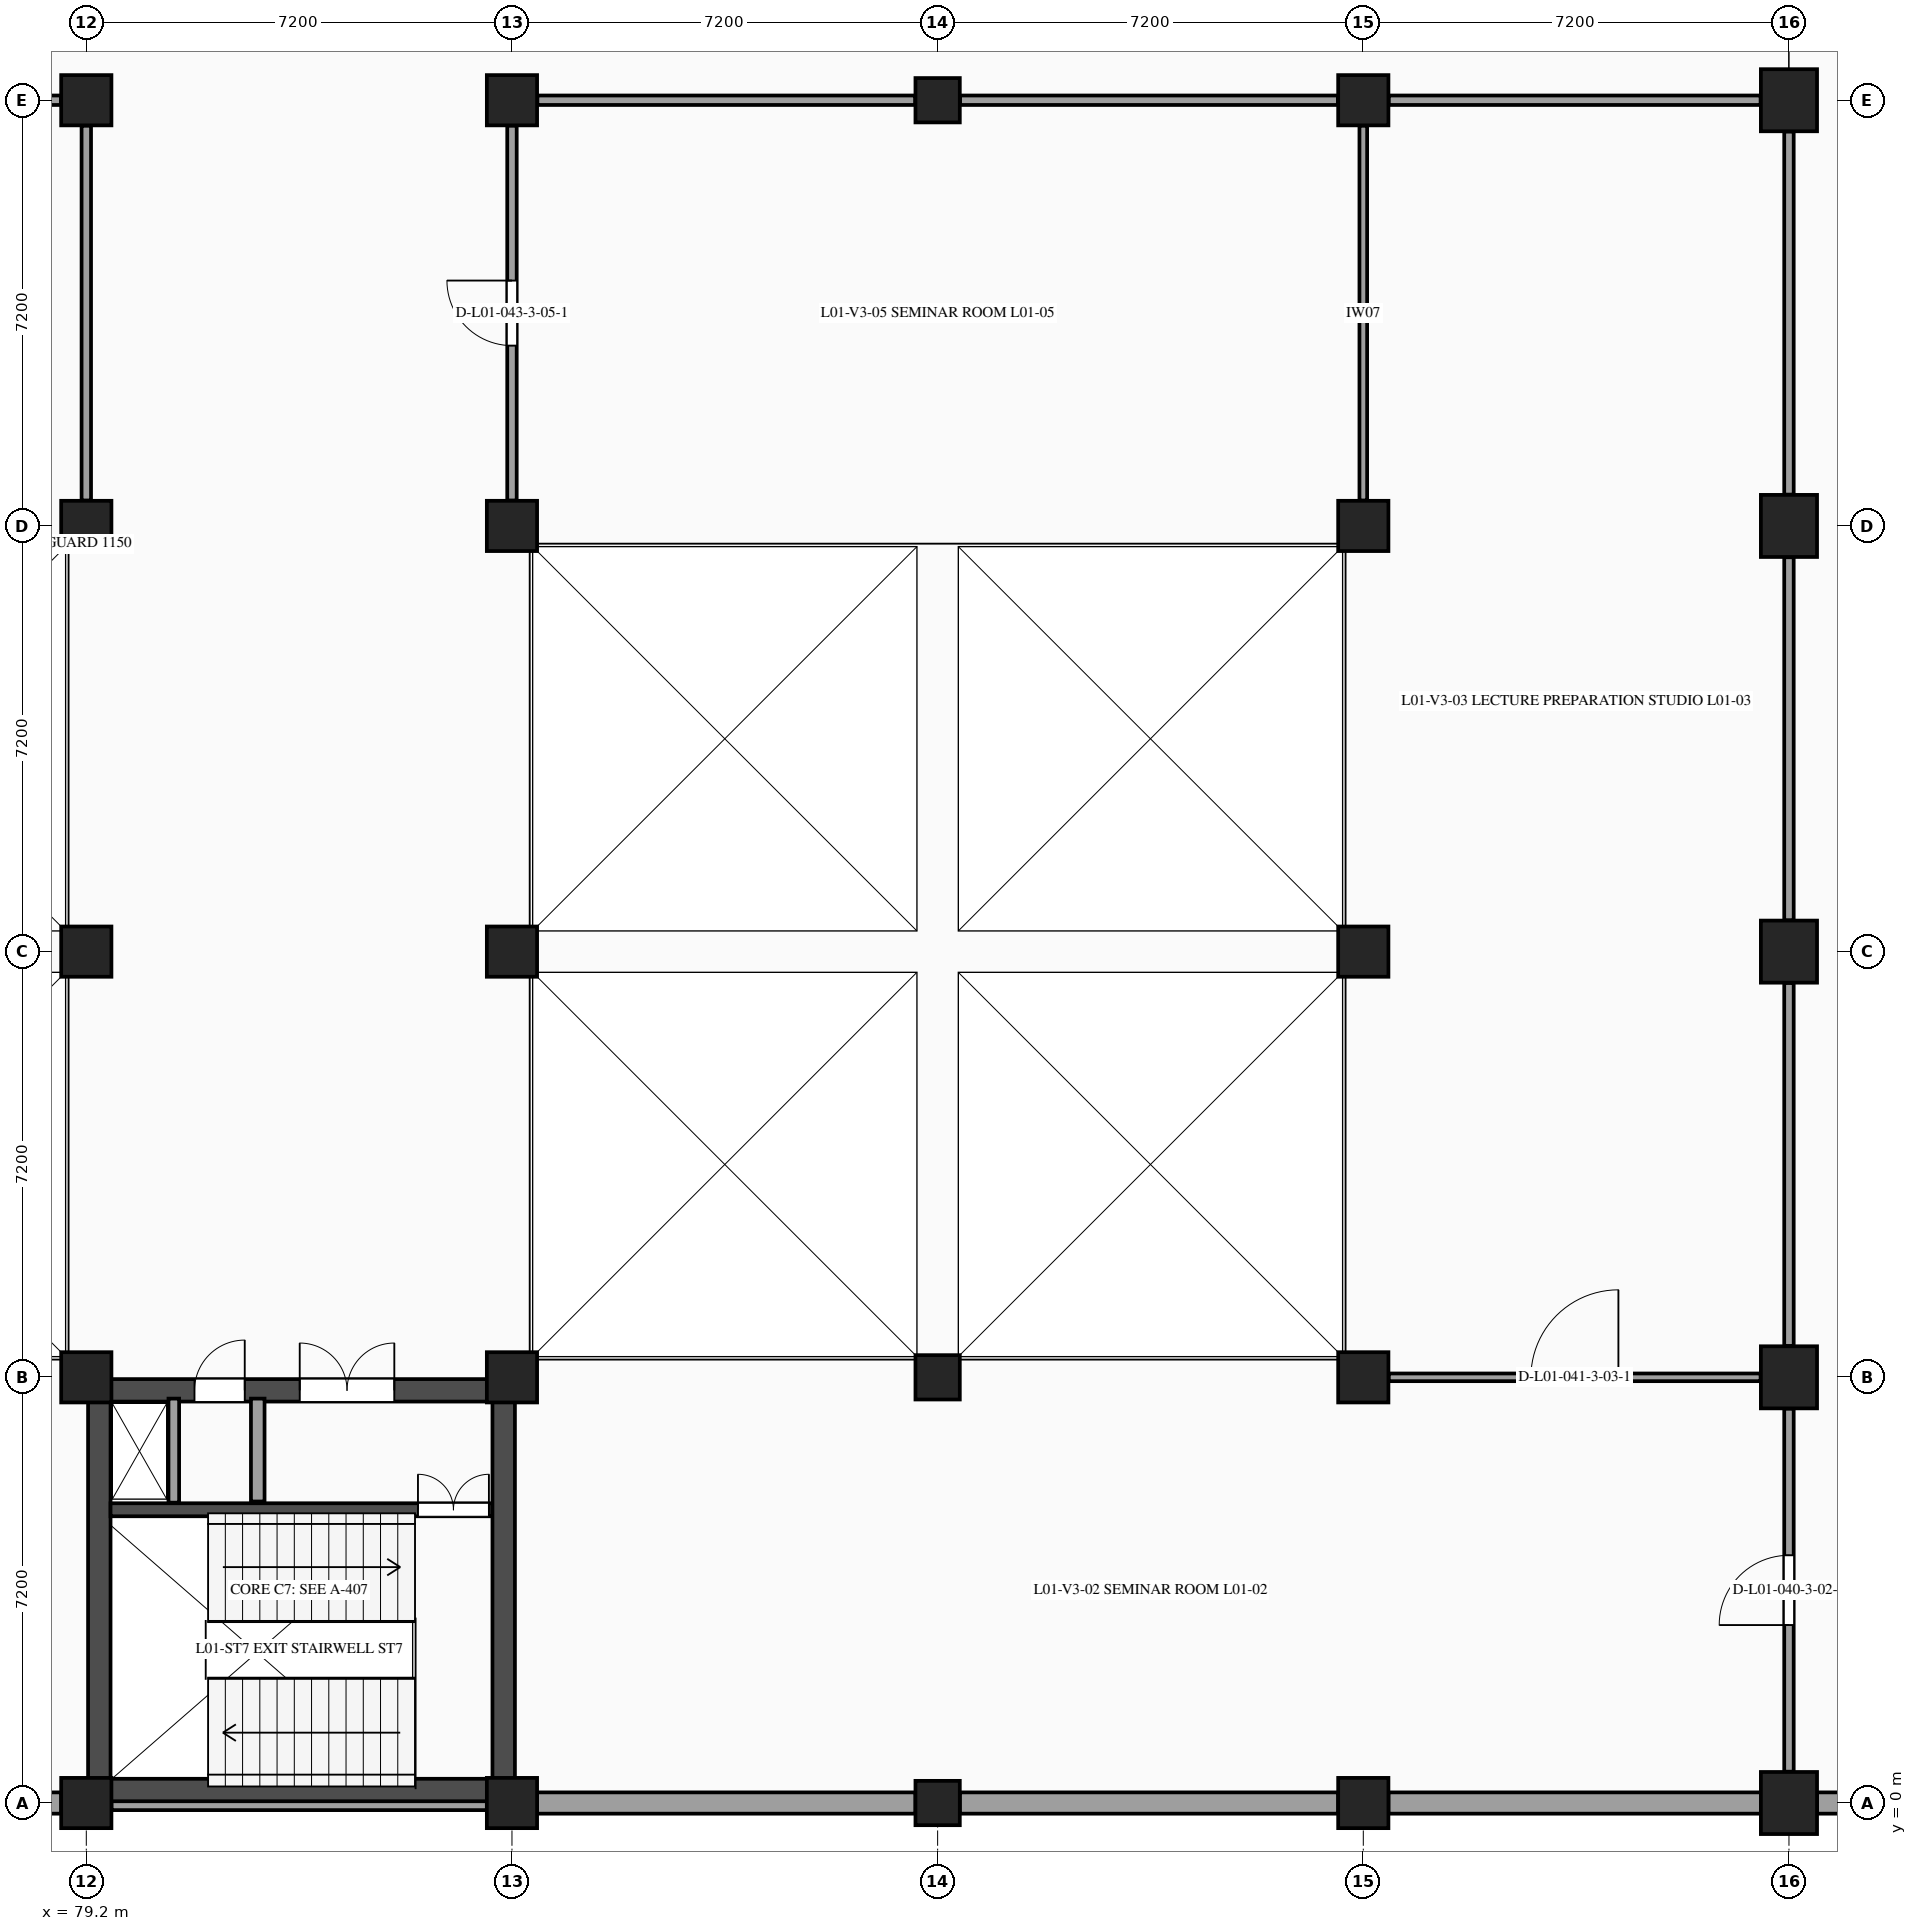
"""IFC4 building model, lengths in metres.
Left out: names, types, materials, properties, quantities, classifications, styles, units other than length and angle.
Written with IfcOpenShell. Run it as: python <this file> out.ifc"""

import sys

from ifc_helpers import new_model, si_unit, direction, frame, frame_2d, origin, origin_2d, place, context, subcontext, project, spatial, rectangle, extrude, element, fill, save


model = new_model("IFC4")
c1 = context("Model", 3, precision=1e-05, world=origin(), true_north=direction((0.0, 1.0)))
c2 = subcontext(c1, "Body", "Model", "MODEL_VIEW")
j1 = project(units=[si_unit("LENGTHUNIT", "METRE"), si_unit("PLANEANGLEUNIT", "RADIAN")], contexts=[c1])
p1 = place(None, origin())
s1 = spatial("IfcSite", under=j1, at=p1, CompositionType="ELEMENT")
p2 = place(p1, origin())
s2 = spatial("IfcBuilding", under=s1, at=p2, CompositionType="ELEMENT")
p3 = place(p2, frame((0.0, 0.0, 5.4)))
s3 = spatial("IfcBuildingStorey", under=s2, at=p3, CompositionType="ELEMENT", Elevation=5.4)
for number, where, z_axis, x_axis in (
    (1, (79.2, 0.0, 0.0), (0.0, 0.0, 1.0), (1.0, 0.0, 0.0)),
    (2, (79.2, 7.2, 0.0), (0.0, 0.0, 1.0), (1.0, 0.0, 0.0)),
    (3, (79.2, 14.4, 0.0), (0.0, 0.0, 1.0), (1.0, 0.0, 0.0)),
    (4, (79.2, 21.6, 0.0), (0.0, 0.0, 1.0), (1.0, 0.0, 0.0)),
    (5, (79.2, 28.8, 0.0), (0.0, 0.0, 1.0), (1.0, 0.0, 0.0)),
    (6, (86.4, 0.0, 0.0), (0.0, 0.0, 1.0), (1.0, 0.0, 0.0)),
    (7, (86.4, 7.2, 0.0), (0.0, 0.0, 1.0), (1.0, 0.0, 0.0)),
    (8, (86.4, 14.4, 0.0), (0.0, 0.0, 1.0), (1.0, 0.0, 0.0)),
    (9, (86.4, 21.6, 0.0), (0.0, 0.0, 1.0), (1.0, 0.0, 0.0)),
    (10, (86.4, 28.8, 0.0), (0.0, 0.0, 1.0), (1.0, 0.0, 0.0)),
):
    element("IfcColumn", number, at=place(p3, frame(where, z_axis=z_axis, x_axis=x_axis)), inside=s3, PredefinedType="COLUMN", context=c2, shape_type="SweptSolid", body=[
        extrude(rectangle(XDim=0.85, YDim=0.85, at=origin_2d()), origin(), (0.0, 0.0, 1.0), 4.5),
    ])
for number, where, z_axis, x_axis in (
    (11, (93.6, 0.0, 0.0), (0.0, 0.0, 1.0), (1.0, 0.0, 0.0)),
    (12, (93.6, 7.2, 0.0), (0.0, 0.0, 1.0), (1.0, 0.0, 0.0)),
    (13, (93.6, 28.8, 0.0), (0.0, 0.0, 1.0), (1.0, 0.0, 0.0)),
):
    element("IfcColumn", number, at=place(p3, frame(where, z_axis=z_axis, x_axis=x_axis)), inside=s3, PredefinedType="COLUMN", context=c2, shape_type="SweptSolid", body=[
        extrude(rectangle(XDim=0.75, YDim=0.75, at=origin_2d()), origin(), (0.0, 0.0, 1.0), 4.5),
    ])
for number, where, z_axis, x_axis in (
    (14, (100.8, 0.0, 0.0), (0.0, 0.0, 1.0), (1.0, 0.0, 0.0)),
    (15, (100.8, 7.2, 0.0), (0.0, 0.0, 1.0), (1.0, 0.0, 0.0)),
    (16, (100.8, 14.4, 0.0), (0.0, 0.0, 1.0), (1.0, 0.0, 0.0)),
    (17, (100.8, 21.6, 0.0), (0.0, 0.0, 1.0), (1.0, 0.0, 0.0)),
    (18, (100.8, 28.8, 0.0), (0.0, 0.0, 1.0), (1.0, 0.0, 0.0)),
):
    element("IfcColumn", number, at=place(p3, frame(where, z_axis=z_axis, x_axis=x_axis)), inside=s3, PredefinedType="COLUMN", context=c2, shape_type="SweptSolid", body=[
        extrude(rectangle(XDim=0.85, YDim=0.85, at=origin_2d()), origin(), (0.0, 0.0, 1.0), 4.5),
    ])
for number, where, z_axis, x_axis in (
    (19, (108.0, 0.0, 0.0), (0.0, 0.0, 1.0), (1.0, 0.0, 0.0)),
    (20, (108.0, 7.2, 0.0), (0.0, 0.0, 1.0), (1.0, 0.0, 0.0)),
    (21, (108.0, 14.4, 0.0), (0.0, 0.0, 1.0), (1.0, 0.0, 0.0)),
    (22, (108.0, 21.6, 0.0), (0.0, 0.0, 1.0), (1.0, 0.0, 0.0)),
    (23, (108.0, 28.8, 0.0), (0.0, 0.0, 1.0), (1.0, 0.0, 0.0)),
):
    element("IfcColumn", number, at=place(p3, frame(where, z_axis=z_axis, x_axis=x_axis)), inside=s3, PredefinedType="COLUMN", context=c2, shape_type="SweptSolid", body=[
        extrude(rectangle(XDim=0.95, YDim=1.05, at=origin_2d()), origin(), (0.0, 0.0, 1.0), 4.5),
    ])
p4 = place(p3, frame((114.7, 0.0, 0.0), z_axis=(0.0, 0.0, 1.0), x_axis=(-1.0, 0.0, 0.0)))
e24 = element("IfcWall", 24, at=p4, inside=s3, PredefinedType="STANDARD", context=c2, shape_type="SweptSolid", body=[
    extrude(rectangle(XDim=6.225, YDim=0.36, at=frame_2d((3.112, 0.0))), origin(), (0.0, 0.0, 1.0), 3.78),
])
p5 = place(p3, frame((107.525, 0.0, 0.0), z_axis=(0.0, 0.0, 1.0), x_axis=(-1.0, 0.0, 0.0)))
e25 = element("IfcWall", 25, at=p5, inside=s3, PredefinedType="STANDARD", context=c2, shape_type="SweptSolid", body=[
    extrude(rectangle(XDim=6.3, YDim=0.36, at=frame_2d((3.15, 0.0))), origin(), (0.0, 0.0, 1.0), 3.49),
])
p6 = place(p3, frame((100.375, 0.0, 0.0), z_axis=(0.0, 0.0, 1.0), x_axis=(-1.0, 0.0, 0.0)))
e26 = element("IfcWall", 26, at=p6, inside=s3, PredefinedType="STANDARD", context=c2, shape_type="SweptSolid", body=[
    extrude(rectangle(XDim=6.4, YDim=0.36, at=frame_2d((3.2, 0.0))), origin(), (0.0, 0.0, 1.0), 3.49),
])
p7 = place(p3, frame((93.225, 0.0, 0.0), z_axis=(0.0, 0.0, 1.0), x_axis=(-1.0, 0.0, 0.0)))
e27 = element("IfcWall", 27, at=p7, inside=s3, PredefinedType="STANDARD", context=c2, shape_type="SweptSolid", body=[
    extrude(rectangle(XDim=6.4, YDim=0.36, at=frame_2d((3.2, 0.0))), origin(), (0.0, 0.0, 1.0), 3.49),
])
p8 = place(p3, frame((85.975, 0.0, 0.0), z_axis=(0.0, 0.0, 1.0), x_axis=(-1.0, 0.0, 0.0)))
e28 = element("IfcWall", 28, at=p8, inside=s3, PredefinedType="STANDARD", context=c2, shape_type="SweptSolid", body=[
    extrude(rectangle(XDim=6.35, YDim=0.24, at=frame_2d((3.175, 0.0))), origin(), (0.0, 0.0, 1.0), 3.49),
])
p9 = place(p3, frame((78.775, 0.0, 0.0), z_axis=(0.0, 0.0, 1.0), x_axis=(-1.0, 0.0, 0.0)))
e29 = element("IfcWall", 29, at=p9, inside=s3, PredefinedType="STANDARD", context=c2, shape_type="SweptSolid", body=[
    extrude(rectangle(XDim=6.4, YDim=0.36, at=frame_2d((3.2, 0.0))), origin(), (0.0, 0.0, 1.0), 3.49),
])
p10 = place(p3, frame((79.61, 0.22, 0.0), z_axis=(0.0, 0.0, 1.0), x_axis=(1.0, 0.0, 0.0)))
e30 = element("IfcWall", 30, at=p10, inside=s3, PredefinedType="SHEAR", context=c2, shape_type="SweptSolid", body=[
    extrude(rectangle(XDim=6.46, YDim=0.38, at=frame_2d((3.23, 0.0))), origin(), (0.0, 0.0, 1.0), 4.21),
])
p11 = place(p3, frame((79.42, 7.17, 0.0), z_axis=(0.0, 0.0, 1.0), x_axis=(0.0, -1.0, 0.0)))
e31 = element("IfcWall", 31, at=p11, inside=s3, PredefinedType="SHEAR", context=c2, shape_type="SweptSolid", body=[
    extrude(rectangle(XDim=7.14, YDim=0.38, at=frame_2d((3.57, 0.0))), origin(), (0.0, 0.0, 1.0), 4.21),
])
p12 = place(p3, frame((79.61, 6.98, 0.0), z_axis=(0.0, 0.0, 1.0), x_axis=(1.0, 0.0, 0.0)))
e32 = element("IfcWall", 32, at=p12, inside=s3, PredefinedType="SHEAR", context=c2, shape_type="SweptSolid", body=[
    extrude(rectangle(XDim=6.46, YDim=0.38, at=frame_2d((3.23, 0.0))), origin(), (0.0, 0.0, 1.0), 4.21),
])
p13 = place(p12, frame((1.42, 0.0, 0.0)))
e33 = element("IfcOpeningElement", 33, at=p13, cuts=e32, PredefinedType="OPENING", context=c2, shape_type="SweptSolid", body=[
    extrude(rectangle(XDim=0.85, YDim=2.1, at=frame_2d((0.425, 1.05))), frame((0.0, 0.2, 0.0), z_axis=(0.0, -1.0, 0.0), x_axis=(1.0, 0.0, 0.0)), (0.0, 0.0, 1.0), 0.4),
])
p14 = place(p12, frame((3.2, 0.0, 0.0)))
e34 = element("IfcOpeningElement", 34, at=p14, cuts=e32, PredefinedType="OPENING", context=c2, shape_type="SweptSolid", body=[
    extrude(rectangle(XDim=1.6, YDim=2.2, at=frame_2d((0.8, 1.1))), frame((0.0, 0.2, 0.0), z_axis=(0.0, -1.0, 0.0), x_axis=(1.0, 0.0, 0.0)), (0.0, 0.0, 1.0), 0.4),
])
p15 = place(p3, frame((79.61, 4.96, 0.0), z_axis=(0.0, 0.0, 1.0), x_axis=(1.0, 0.0, 0.0)))
e35 = element("IfcWall", 35, at=p15, inside=s3, PredefinedType="SHEAR", context=c2, shape_type="SweptSolid", body=[
    extrude(rectangle(XDim=6.46, YDim=0.22, at=frame_2d((3.23, 0.0))), origin(), (0.0, 0.0, 1.0), 4.21),
])
p16 = place(p15, frame((5.2, 0.0, 0.0)))
e36 = element("IfcOpeningElement", 36, at=p16, cuts=e35, PredefinedType="OPENING", context=c2, shape_type="SweptSolid", body=[
    extrude(rectangle(XDim=1.2, YDim=2.2, at=frame_2d((0.6, 1.1))), frame((0.0, 0.12, 0.0), z_axis=(0.0, -1.0, 0.0), x_axis=(1.0, 0.0, 0.0)), (0.0, 0.0, 1.0), 0.24),
])
p17 = place(p3, frame((82.1, 5.1, 0.0), z_axis=(0.0, 0.0, 1.0), x_axis=(0.0, 1.0, 0.0)))
e37 = element("IfcWall", 37, at=p17, inside=s3, PredefinedType="PARTITIONING", context=c2, shape_type="SweptSolid", body=[
    extrude(rectangle(XDim=1.74, YDim=0.23, at=frame_2d((0.87, 0.0))), origin(), (0.0, 0.0, 1.0), 4.21),
])
p18 = place(p3, frame((80.68, 5.08, 0.0), z_axis=(0.0, 0.0, 1.0), x_axis=(0.0, 1.0, 0.0)))
e38 = element("IfcWall", 38, at=p18, inside=s3, PredefinedType="PARTITIONING", context=c2, shape_type="SweptSolid", body=[
    extrude(rectangle(XDim=1.76, YDim=0.18, at=frame_2d((0.88, 0.0))), origin(), (0.0, 0.0, 1.0), 4.21),
])
p19 = place(p3, frame((86.26, 0.03, 0.0), z_axis=(0.0, 0.0, 1.0), x_axis=(0.0, 1.0, 0.0)))
e39 = element("IfcWall", 39, at=p19, inside=s3, PredefinedType="SHEAR", context=c2, shape_type="SweptSolid", body=[
    extrude(rectangle(XDim=7.14, YDim=0.38, at=frame_2d((3.57, 0.0))), origin(), (0.0, 0.0, 1.0), 4.21),
])
p20 = place(p3, frame((79.2, 22.03, 0.0), z_axis=(0.0, 0.0, 1.0), x_axis=(0.0, 1.0, 0.0)))
e40 = element("IfcWall", 40, at=p20, inside=s3, PredefinedType="PARTITIONING", context=c2, shape_type="SweptSolid", body=[
    extrude(rectangle(XDim=6.34, YDim=0.16, at=frame_2d((3.17, 0.0))), origin(), (0.0, 0.0, 1.0), 3.515),
])
p21 = place(p3, frame((72.38, 28.8, 0.0), z_axis=(0.0, 0.0, 1.0), x_axis=(1.0, 0.0, 0.0)))
e41 = element("IfcWall", 41, at=p21, inside=s3, PredefinedType="PARTITIONING", context=c2, shape_type="SweptSolid", body=[
    extrude(rectangle(XDim=6.39, YDim=0.16, at=frame_2d((3.195, 0.0))), origin(), (0.0, 0.0, 1.0), 3.46),
])
p22 = place(p3, frame((86.4, 22.03, 0.0), z_axis=(0.0, 0.0, 1.0), x_axis=(0.0, 1.0, 0.0)))
e42 = element("IfcWall", 42, at=p22, inside=s3, PredefinedType="PARTITIONING", context=c2, shape_type="SweptSolid", body=[
    extrude(rectangle(XDim=6.34, YDim=0.16, at=frame_2d((3.17, 0.0))), origin(), (0.0, 0.0, 1.0), 3.515),
])
p23 = place(p22, frame((2.62, 0.0, 0.0)))
e43 = element("IfcOpeningElement", 43, at=p23, cuts=e42, PredefinedType="OPENING", context=c2, shape_type="SweptSolid", body=[
    extrude(rectangle(XDim=1.1, YDim=2.15, at=frame_2d((0.55, 1.075))), frame((0.0, 0.09, 0.0), z_axis=(0.0, -1.0, 0.0), x_axis=(1.0, 0.0, 0.0)), (0.0, 0.0, 1.0), 0.18),
])
p24 = place(p3, frame((86.83, 28.8, 0.0), z_axis=(0.0, 0.0, 1.0), x_axis=(1.0, 0.0, 0.0)))
e44 = element("IfcWall", 44, at=p24, inside=s3, PredefinedType="PARTITIONING", context=c2, shape_type="SweptSolid", body=[
    extrude(rectangle(XDim=6.39, YDim=0.16, at=frame_2d((3.195, 0.0))), origin(), (0.0, 0.0, 1.0), 3.485),
])
p25 = place(p3, frame((100.8, 22.03, 0.0), z_axis=(0.0, 0.0, 1.0), x_axis=(0.0, 1.0, 0.0)))
e45 = element("IfcWall", 45, at=p25, inside=s3, PredefinedType="PARTITIONING", context=c2, shape_type="SweptSolid", body=[
    extrude(rectangle(XDim=6.34, YDim=0.13, at=frame_2d((3.17, 0.0))), origin(), (0.0, 0.0, 1.0), 3.515),
])
p26 = place(p3, frame((93.98, 28.8, 0.0), z_axis=(0.0, 0.0, 1.0), x_axis=(1.0, 0.0, 0.0)))
e46 = element("IfcWall", 46, at=p26, inside=s3, PredefinedType="PARTITIONING", context=c2, shape_type="SweptSolid", body=[
    extrude(rectangle(XDim=6.39, YDim=0.16, at=frame_2d((3.195, 0.0))), origin(), (0.0, 0.0, 1.0), 3.49),
])
p27 = place(p3, frame((108.0, 0.53, 0.0), z_axis=(0.0, 0.0, 1.0), x_axis=(0.0, 1.0, 0.0)))
e47 = element("IfcWall", 47, at=p27, inside=s3, PredefinedType="PARTITIONING", context=c2, shape_type="SweptSolid", body=[
    extrude(rectangle(XDim=6.14, YDim=0.16, at=frame_2d((3.07, 0.0))), origin(), (0.0, 0.0, 1.0), 3.525),
])
p28 = place(p27, frame((2.48, 0.0, 0.0)))
e48 = element("IfcOpeningElement", 48, at=p28, cuts=e47, PredefinedType="OPENING", context=c2, shape_type="SweptSolid", body=[
    extrude(rectangle(XDim=1.18, YDim=2.18, at=frame_2d((0.59, 1.09))), frame((0.0, 0.09, 0.0), z_axis=(0.0, -1.0, 0.0), x_axis=(1.0, 0.0, 0.0)), (0.0, 0.0, 1.0), 0.18),
])
p29 = place(p3, frame((101.23, 7.2, 0.0), z_axis=(0.0, 0.0, 1.0), x_axis=(1.0, 0.0, 0.0)))
e49 = element("IfcWall", 49, at=p29, inside=s3, PredefinedType="PARTITIONING", context=c2, shape_type="SweptSolid", body=[
    extrude(rectangle(XDim=6.29, YDim=0.13, at=frame_2d((3.145, 0.0))), origin(), (0.0, 0.0, 1.0), 3.51),
])
p30 = place(p29, frame((2.405, 0.0, 0.0)))
e50 = element("IfcOpeningElement", 50, at=p30, cuts=e49, PredefinedType="OPENING", context=c2, shape_type="SweptSolid", body=[
    extrude(rectangle(XDim=1.48, YDim=2.28, at=frame_2d((0.74, 1.14))), frame((0.0, 0.075, 0.0), z_axis=(0.0, -1.0, 0.0), x_axis=(1.0, 0.0, 0.0)), (0.0, 0.0, 1.0), 0.15),
])
p31 = place(p3, frame((108.0, 7.73, 0.0), z_axis=(0.0, 0.0, 1.0), x_axis=(0.0, 1.0, 0.0)))
e51 = element("IfcWall", 51, at=p31, inside=s3, PredefinedType="PARTITIONING", context=c2, shape_type="SweptSolid", body=[
    extrude(rectangle(XDim=6.14, YDim=0.16, at=frame_2d((3.07, 0.0))), origin(), (0.0, 0.0, 1.0), 3.525),
])
p32 = place(p3, frame((108.0, 14.93, 0.0), z_axis=(0.0, 0.0, 1.0), x_axis=(0.0, 1.0, 0.0)))
e52 = element("IfcWall", 52, at=p32, inside=s3, PredefinedType="PARTITIONING", context=c2, shape_type="SweptSolid", body=[
    extrude(rectangle(XDim=6.14, YDim=0.16, at=frame_2d((3.07, 0.0))), origin(), (0.0, 0.0, 1.0), 3.52),
])
p33 = place(p3, frame((108.0, 22.13, 0.0), z_axis=(0.0, 0.0, 1.0), x_axis=(0.0, 1.0, 0.0)))
e53 = element("IfcWall", 53, at=p33, inside=s3, PredefinedType="PARTITIONING", context=c2, shape_type="SweptSolid", body=[
    extrude(rectangle(XDim=6.14, YDim=0.16, at=frame_2d((3.07, 0.0))), origin(), (0.0, 0.0, 1.0), 3.515),
])
p34 = place(p3, frame((101.23, 28.8, 0.0), z_axis=(0.0, 0.0, 1.0), x_axis=(1.0, 0.0, 0.0)))
e54 = element("IfcWall", 54, at=p34, inside=s3, PredefinedType="PARTITIONING", context=c2, shape_type="SweptSolid", body=[
    extrude(rectangle(XDim=6.29, YDim=0.16, at=frame_2d((3.145, 0.0))), origin(), (0.0, 0.0, 1.0), 3.51),
])
p35 = place(p13, origin())
e55 = element("IfcDoor", 55, at=p35, inside=s3, OperationType="SINGLE_SWING_RIGHT", PredefinedType="DOOR", context=c2, shape_type="SweptSolid", body=[
    extrude(rectangle(XDim=0.85, YDim=2.1, at=frame_2d((0.425, 1.05))), frame((0.0, 0.025, 0.0), z_axis=(0.0, -1.0, 0.0), x_axis=(1.0, 0.0, 0.0)), (0.0, 0.0, 1.0), 0.05),
])
fill(e33, e55)
p36 = place(p16, origin())
e56 = element("IfcDoor", 56, at=p36, inside=s3, OperationType="DOUBLE_DOOR_SINGLE_SWING", PredefinedType="DOOR", context=c2, shape_type="SweptSolid", body=[
    extrude(rectangle(XDim=1.2, YDim=2.2, at=frame_2d((0.6, 1.1))), frame((0.0, 0.025, 0.0), z_axis=(0.0, -1.0, 0.0), x_axis=(1.0, 0.0, 0.0)), (0.0, 0.0, 1.0), 0.05),
])
fill(e36, e56)
p37 = place(p14, frame((1.6, 0.0, 0.0), z_axis=(0.0, 0.0, 1.0), x_axis=(-1.0, 0.0, 0.0)))
e57 = element("IfcDoor", 57, at=p37, inside=s3, OperationType="DOUBLE_DOOR_SINGLE_SWING", PredefinedType="DOOR", context=c2, shape_type="SweptSolid", body=[
    extrude(rectangle(XDim=1.6, YDim=2.2, at=frame_2d((0.8, 1.1))), frame((0.0, 0.025, 0.0), z_axis=(0.0, -1.0, 0.0), x_axis=(1.0, 0.0, 0.0)), (0.0, 0.0, 1.0), 0.05),
])
fill(e34, e57)
p38 = place(p28, origin())
e58 = element("IfcDoor", 58, at=p38, inside=s3, OperationType="SINGLE_SWING_LEFT", PredefinedType="DOOR", context=c2, shape_type="SweptSolid", body=[
    extrude(rectangle(XDim=1.18, YDim=2.18, at=frame_2d((0.59, 1.09))), frame((0.0, 0.025, 0.0), z_axis=(0.0, -1.0, 0.0), x_axis=(1.0, 0.0, 0.0)), (0.0, 0.0, 1.0), 0.05),
])
fill(e48, e58)
p39 = place(p30, origin())
e59 = element("IfcDoor", 59, at=p39, inside=s3, OperationType="SINGLE_SWING_RIGHT", PredefinedType="DOOR", context=c2, shape_type="SweptSolid", body=[
    extrude(rectangle(XDim=1.48, YDim=2.28, at=frame_2d((0.74, 1.14))), frame((0.0, 0.025, 0.0), z_axis=(0.0, -1.0, 0.0), x_axis=(1.0, 0.0, 0.0)), (0.0, 0.0, 1.0), 0.05),
])
fill(e50, e59)
p40 = place(p23, origin())
e60 = element("IfcDoor", 60, at=p40, inside=s3, OperationType="SINGLE_SWING_RIGHT", PredefinedType="DOOR", context=c2, shape_type="SweptSolid", body=[
    extrude(rectangle(XDim=1.1, YDim=2.15, at=frame_2d((0.55, 1.075))), frame((0.0, 0.025, 0.0), z_axis=(0.0, -1.0, 0.0), x_axis=(1.0, 0.0, 0.0)), (0.0, 0.0, 1.0), 0.05),
])
fill(e43, e60)
save(model, sys.argv[1])
